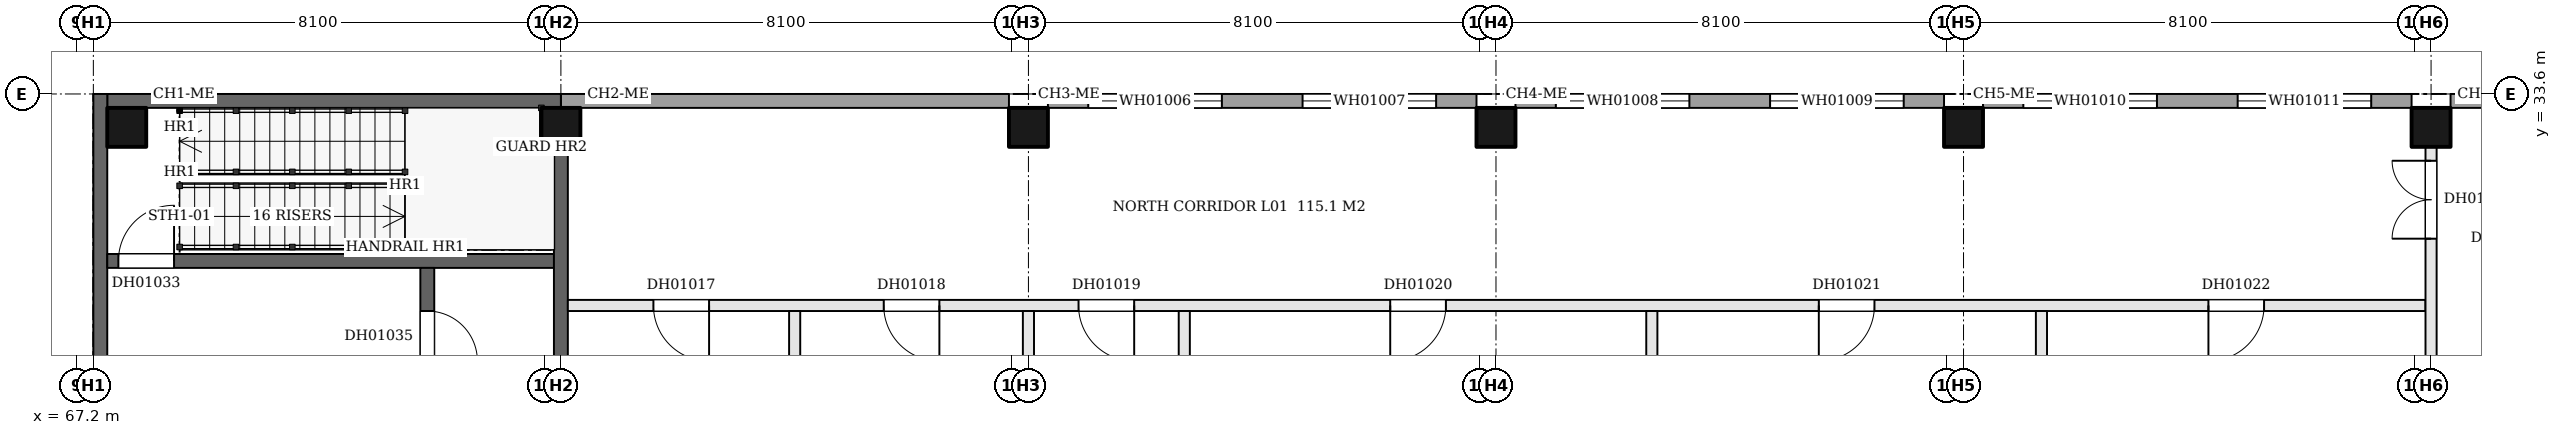
"""IFC4 building model, lengths in metres.
Left out: names, types, materials, properties, quantities, classifications, styles, units other than length and angle.
Written with IfcOpenShell. Run it as: python <this file> out.ifc"""

import sys

from ifc_helpers import new_model, si_unit, direction, frame, frame_2d, origin, origin_2d, place, context, subcontext, project, spatial, rectangle, extrude, element, fill, save


model = new_model("IFC4")
c1 = context("Model", 3, precision=1e-05, world=origin(), true_north=direction((0.0, 1.0)))
c2 = subcontext(c1, "Body", "Model", "MODEL_VIEW")
j1 = project(units=[si_unit("LENGTHUNIT", "METRE"), si_unit("PLANEANGLEUNIT", "RADIAN")], contexts=[c1])
p1 = place(None, origin())
s1 = spatial("IfcSite", under=j1, at=p1, CompositionType="ELEMENT")
p2 = place(p1, origin())
s2 = spatial("IfcBuilding", under=s1, at=p2, CompositionType="ELEMENT")
p3 = place(p2, frame((0.0, 0.0, 9.0)))
s3 = spatial("IfcBuildingStorey", under=s2, at=p3, CompositionType="ELEMENT", Elevation=9.0)
for number, where, z_axis, x_axis in (
    (1, (68.1, 33.0, 0.0), (0.0, 0.0, 1.0), (1.0, 0.0, 0.0)),
    (2, (75.9, 33.0, 0.0), (0.0, 0.0, 1.0), (1.0, 0.0, 0.0)),
    (3, (84.3, 33.0, 0.0), (0.0, 0.0, 1.0), (1.0, 0.0, 0.0)),
    (4, (92.7, 33.0, 0.0), (0.0, 0.0, 1.0), (1.0, 0.0, 0.0)),
    (5, (101.1, 33.0, 0.0), (0.0, 0.0, 1.0), (1.0, 0.0, 0.0)),
    (6, (109.5, 33.0, 0.0), (0.0, 0.0, 1.0), (1.0, 0.0, 0.0)),
):
    element("IfcColumn", number, at=place(p3, frame(where, z_axis=z_axis, x_axis=x_axis)), inside=s3, PredefinedType="COLUMN", context=c2, shape_type="SweptSolid", body=[
        extrude(rectangle(XDim=0.7, YDim=0.7, at=origin_2d()), origin(), (0.0, 0.0, 1.0), 5.1),
    ])
p4 = place(p3, frame((76.025, 29.8, 0.0), z_axis=(0.0, 0.0, 1.0), x_axis=(1.0, 0.0, 0.0)))
e7 = element("IfcWall", 7, at=p4, inside=s3, PredefinedType="PARTITIONING", context=c2, shape_type="SweptSolid", body=[
    extrude(rectangle(XDim=33.375, YDim=0.2, at=frame_2d((16.688, 0.0))), origin(), (0.0, 0.0, 1.0), 5.1),
])
p5 = place(p4, frame((1.538, 0.0, 0.0)))
e8 = element("IfcOpeningElement", 8, at=p5, cuts=e7, PredefinedType="OPENING", context=c2, shape_type="SweptSolid", body=[
    extrude(rectangle(XDim=1.0, YDim=2.1, at=frame_2d((0.5, 1.05))), frame((0.0, 0.11, 0.0), z_axis=(0.0, -1.0, 0.0), x_axis=(1.0, 0.0, 0.0)), (0.0, 0.0, 1.0), 0.22),
])
p6 = place(p4, frame((5.675, 0.0, 0.0)))
e9 = element("IfcOpeningElement", 9, at=p6, cuts=e7, PredefinedType="OPENING", context=c2, shape_type="SweptSolid", body=[
    extrude(rectangle(XDim=1.0, YDim=2.1, at=frame_2d((0.5, 1.05))), frame((0.0, 0.11, 0.0), z_axis=(0.0, -1.0, 0.0), x_axis=(1.0, 0.0, 0.0)), (0.0, 0.0, 1.0), 0.22),
])
p7 = place(p4, frame((9.175, 0.0, 0.0)))
e10 = element("IfcOpeningElement", 10, at=p7, cuts=e7, PredefinedType="OPENING", context=c2, shape_type="SweptSolid", body=[
    extrude(rectangle(XDim=1.0, YDim=2.1, at=frame_2d((0.5, 1.05))), frame((0.0, 0.11, 0.0), z_axis=(0.0, -1.0, 0.0), x_axis=(1.0, 0.0, 0.0)), (0.0, 0.0, 1.0), 0.22),
])
p8 = place(p4, frame((14.775, 0.0, 0.0)))
e11 = element("IfcOpeningElement", 11, at=p8, cuts=e7, PredefinedType="OPENING", context=c2, shape_type="SweptSolid", body=[
    extrude(rectangle(XDim=1.0, YDim=2.1, at=frame_2d((0.5, 1.05))), frame((0.0, 0.11, 0.0), z_axis=(0.0, -1.0, 0.0), x_axis=(1.0, 0.0, 0.0)), (0.0, 0.0, 1.0), 0.22),
])
p9 = place(p4, frame((22.475, 0.0, 0.0)))
e12 = element("IfcOpeningElement", 12, at=p9, cuts=e7, PredefinedType="OPENING", context=c2, shape_type="SweptSolid", body=[
    extrude(rectangle(XDim=1.0, YDim=2.1, at=frame_2d((0.5, 1.05))), frame((0.0, 0.11, 0.0), z_axis=(0.0, -1.0, 0.0), x_axis=(1.0, 0.0, 0.0)), (0.0, 0.0, 1.0), 0.22),
])
p10 = place(p4, frame((29.475, 0.0, 0.0)))
e13 = element("IfcOpeningElement", 13, at=p10, cuts=e7, PredefinedType="OPENING", context=c2, shape_type="SweptSolid", body=[
    extrude(rectangle(XDim=1.0, YDim=2.1, at=frame_2d((0.5, 1.05))), frame((0.0, 0.11, 0.0), z_axis=(0.0, -1.0, 0.0), x_axis=(1.0, 0.0, 0.0)), (0.0, 0.0, 1.0), 0.22),
])
p11 = place(p3, frame((67.75, 30.6, 0.0), z_axis=(0.0, 0.0, 1.0), x_axis=(1.0, 0.0, 0.0)))
e14 = element("IfcWall", 14, at=p11, inside=s3, PredefinedType="SHEAR", context=c2, shape_type="SweptSolid", body=[
    extrude(rectangle(XDim=8.025, YDim=0.25, at=frame_2d((4.012, 0.0))), origin(), (0.0, 0.0, 1.0), 5.1),
])
p12 = place(p11, frame((0.2, 0.0, 0.0)))
e15 = element("IfcOpeningElement", 15, at=p12, cuts=e14, PredefinedType="OPENING", context=c2, shape_type="SweptSolid", body=[
    extrude(rectangle(XDim=1.0, YDim=2.1, at=frame_2d((0.5, 1.05))), frame((0.0, 0.135, 0.0), z_axis=(0.0, -1.0, 0.0), x_axis=(1.0, 0.0, 0.0)), (0.0, 0.0, 1.0), 0.27),
])
p13 = place(p3, frame((67.75, 33.475, 0.0), z_axis=(0.0, 0.0, 1.0), x_axis=(1.0, 0.0, 0.0)))
e16 = element("IfcWall", 16, at=p13, inside=s3, PredefinedType="SHEAR", context=c2, shape_type="SweptSolid", body=[
    extrude(rectangle(XDim=8.15, YDim=0.25, at=frame_2d((4.075, 0.0))), origin(), (0.0, 0.0, 1.0), 5.1),
])
p14 = place(p3, frame((75.9, 33.475, 0.0), z_axis=(0.0, 0.0, 1.0), x_axis=(1.0, 0.0, 0.0)))
e17 = element("IfcWall", 17, at=p14, inside=s3, PredefinedType="SOLIDWALL", context=c2, shape_type="SweptSolid", body=[
    extrude(rectangle(XDim=8.05, YDim=0.25, at=frame_2d((4.025, 0.0))), origin(), (0.0, 0.0, 1.0), 5.1),
])
p15 = place(p3, frame((84.65, 33.475, 0.0), z_axis=(0.0, 0.0, 1.0), x_axis=(1.0, 0.0, 0.0)))
e18 = element("IfcWall", 18, at=p15, inside=s3, PredefinedType="SOLIDWALL", context=c2, shape_type="SweptSolid", body=[
    extrude(rectangle(XDim=7.7, YDim=0.25, at=frame_2d((3.85, 0.0))), origin(), (0.0, 0.0, 1.0), 5.1),
])
p16 = place(p15, frame((0.725, 0.0, 0.9)))
e19 = element("IfcOpeningElement", 19, at=p16, cuts=e18, PredefinedType="OPENING", context=c2, shape_type="SweptSolid", body=[
    extrude(rectangle(XDim=2.4, YDim=1.5, at=frame_2d((1.2, 0.75))), frame((0.0, 0.135, 0.0), z_axis=(0.0, -1.0, 0.0), x_axis=(1.0, 0.0, 0.0)), (0.0, 0.0, 1.0), 0.27),
])
p17 = place(p15, frame((4.575, 0.0, 0.9)))
e20 = element("IfcOpeningElement", 20, at=p17, cuts=e18, PredefinedType="OPENING", context=c2, shape_type="SweptSolid", body=[
    extrude(rectangle(XDim=2.4, YDim=1.5, at=frame_2d((1.2, 0.75))), frame((0.0, 0.135, 0.0), z_axis=(0.0, -1.0, 0.0), x_axis=(1.0, 0.0, 0.0)), (0.0, 0.0, 1.0), 0.27),
])
p18 = place(p3, frame((93.05, 33.475, 0.0), z_axis=(0.0, 0.0, 1.0), x_axis=(1.0, 0.0, 0.0)))
e21 = element("IfcWall", 21, at=p18, inside=s3, PredefinedType="SOLIDWALL", context=c2, shape_type="SweptSolid", body=[
    extrude(rectangle(XDim=7.7, YDim=0.25, at=frame_2d((3.85, 0.0))), origin(), (0.0, 0.0, 1.0), 5.1),
])
p19 = place(p18, frame((0.725, 0.0, 0.9)))
e22 = element("IfcOpeningElement", 22, at=p19, cuts=e21, PredefinedType="OPENING", context=c2, shape_type="SweptSolid", body=[
    extrude(rectangle(XDim=2.4, YDim=1.5, at=frame_2d((1.2, 0.75))), frame((0.0, 0.135, 0.0), z_axis=(0.0, -1.0, 0.0), x_axis=(1.0, 0.0, 0.0)), (0.0, 0.0, 1.0), 0.27),
])
p20 = place(p18, frame((4.575, 0.0, 0.9)))
e23 = element("IfcOpeningElement", 23, at=p20, cuts=e21, PredefinedType="OPENING", context=c2, shape_type="SweptSolid", body=[
    extrude(rectangle(XDim=2.4, YDim=1.5, at=frame_2d((1.2, 0.75))), frame((0.0, 0.135, 0.0), z_axis=(0.0, -1.0, 0.0), x_axis=(1.0, 0.0, 0.0)), (0.0, 0.0, 1.0), 0.27),
])
p21 = place(p3, frame((101.45, 33.475, 0.0), z_axis=(0.0, 0.0, 1.0), x_axis=(1.0, 0.0, 0.0)))
e24 = element("IfcWall", 24, at=p21, inside=s3, PredefinedType="SOLIDWALL", context=c2, shape_type="SweptSolid", body=[
    extrude(rectangle(XDim=7.7, YDim=0.25, at=frame_2d((3.85, 0.0))), origin(), (0.0, 0.0, 1.0), 5.1),
])
p22 = place(p21, frame((0.725, 0.0, 0.9)))
e25 = element("IfcOpeningElement", 25, at=p22, cuts=e24, PredefinedType="OPENING", context=c2, shape_type="SweptSolid", body=[
    extrude(rectangle(XDim=2.4, YDim=1.5, at=frame_2d((1.2, 0.75))), frame((0.0, 0.135, 0.0), z_axis=(0.0, -1.0, 0.0), x_axis=(1.0, 0.0, 0.0)), (0.0, 0.0, 1.0), 0.27),
])
p23 = place(p21, frame((4.575, 0.0, 0.9)))
e26 = element("IfcOpeningElement", 26, at=p23, cuts=e24, PredefinedType="OPENING", context=c2, shape_type="SweptSolid", body=[
    extrude(rectangle(XDim=2.4, YDim=1.5, at=frame_2d((1.2, 0.75))), frame((0.0, 0.135, 0.0), z_axis=(0.0, -1.0, 0.0), x_axis=(1.0, 0.0, 0.0)), (0.0, 0.0, 1.0), 0.27),
])
p24 = place(p3, frame((109.85, 33.475, 0.0), z_axis=(0.0, 0.0, 1.0), x_axis=(1.0, 0.0, 0.0)))
e27 = element("IfcWall", 27, at=p24, inside=s3, PredefinedType="SOLIDWALL", context=c2, shape_type="SweptSolid", body=[
    extrude(rectangle(XDim=1.725, YDim=0.25, at=frame_2d((0.862, 0.0))), origin(), (0.0, 0.0, 1.0), 5.1),
])
p25 = place(p3, frame((67.625, 25.325, 0.0), z_axis=(0.0, 0.0, 1.0), x_axis=(0.0, 1.0, 0.0)))
e28 = element("IfcWall", 28, at=p25, inside=s3, PredefinedType="SHEAR", context=c2, shape_type="SweptSolid", body=[
    extrude(rectangle(XDim=8.275, YDim=0.25, at=frame_2d((4.138, 0.0))), origin(), (0.0, 0.0, 1.0), 5.1),
])
p26 = place(p3, frame((73.5, 25.325, 0.0), z_axis=(0.0, 0.0, 1.0), x_axis=(0.0, 1.0, 0.0)))
e29 = element("IfcWall", 29, at=p26, inside=s3, PredefinedType="SHEAR", context=c2, shape_type="SweptSolid", body=[
    extrude(rectangle(XDim=5.15, YDim=0.25, at=frame_2d((2.575, 0.0))), origin(), (0.0, 0.0, 1.0), 5.1),
])
p27 = place(p26, frame((0.675, 0.0, 0.0)))
e30 = element("IfcOpeningElement", 30, at=p27, cuts=e29, PredefinedType="OPENING", context=c2, shape_type="SweptSolid", body=[
    extrude(rectangle(XDim=1.1, YDim=2.1, at=frame_2d((0.55, 1.05))), frame((0.0, 0.135, 0.0), z_axis=(0.0, -1.0, 0.0), x_axis=(1.0, 0.0, 0.0)), (0.0, 0.0, 1.0), 0.27),
])
p28 = place(p26, frame((3.475, 0.0, 0.0)))
e31 = element("IfcOpeningElement", 31, at=p28, cuts=e29, PredefinedType="OPENING", context=c2, shape_type="SweptSolid", body=[
    extrude(rectangle(XDim=0.9, YDim=2.1, at=frame_2d((0.45, 1.05))), frame((0.0, 0.135, 0.0), z_axis=(0.0, -1.0, 0.0), x_axis=(1.0, 0.0, 0.0)), (0.0, 0.0, 1.0), 0.27),
])
p29 = place(p3, frame((75.9, 25.55, 0.0), z_axis=(0.0, 0.0, 1.0), x_axis=(0.0, 1.0, 0.0)))
e32 = element("IfcWall", 32, at=p29, inside=s3, PredefinedType="SHEAR", context=c2, shape_type="SweptSolid", body=[
    extrude(rectangle(XDim=7.1, YDim=0.25, at=frame_2d((3.55, 0.0))), origin(), (0.0, 0.0, 1.0), 5.1),
])
p30 = place(p3, frame((80.1, 25.3, 0.0), z_axis=(0.0, 0.0, 1.0), x_axis=(0.0, 1.0, 0.0)))
e33 = element("IfcWall", 33, at=p30, inside=s3, PredefinedType="PARTITIONING", context=c2, shape_type="SweptSolid", body=[
    extrude(rectangle(XDim=4.4, YDim=0.2, at=frame_2d((2.2, 0.0))), origin(), (0.0, 0.0, 1.0), 5.1),
])
p31 = place(p3, frame((84.3, 25.55, 0.0), z_axis=(0.0, 0.0, 1.0), x_axis=(0.0, 1.0, 0.0)))
e34 = element("IfcWall", 34, at=p31, inside=s3, PredefinedType="PARTITIONING", context=c2, shape_type="SweptSolid", body=[
    extrude(rectangle(XDim=4.15, YDim=0.2, at=frame_2d((2.075, 0.0))), origin(), (0.0, 0.0, 1.0), 5.1),
])
for number, where, z_axis, x_axis in (
    (35, (87.1, 25.3, 0.0), (0.0, 0.0, 1.0), (0.0, 1.0, 0.0)),
    (36, (95.5, 25.3, 0.0), (0.0, 0.0, 1.0), (0.0, 1.0, 0.0)),
    (37, (102.5, 25.3, 0.0), (0.0, 0.0, 1.0), (0.0, 1.0, 0.0)),
):
    element("IfcWall", number, at=place(p3, frame(where, z_axis=z_axis, x_axis=x_axis)), inside=s3, PredefinedType="PARTITIONING", context=c2, shape_type="SweptSolid", body=[
        extrude(rectangle(XDim=4.4, YDim=0.2, at=frame_2d((2.2, 0.0))), origin(), (0.0, 0.0, 1.0), 5.1),
    ])
p32 = place(p3, frame((109.5, 25.55, 0.0), z_axis=(0.0, 0.0, 1.0), x_axis=(0.0, 1.0, 0.0)))
e38 = element("IfcWall", 38, at=p32, inside=s3, PredefinedType="PARTITIONING", context=c2, shape_type="SweptSolid", body=[
    extrude(rectangle(XDim=7.1, YDim=0.2, at=frame_2d((3.55, 0.0))), origin(), (0.0, 0.0, 1.0), 5.1),
])
p33 = place(p32, frame((5.45, 0.0, 0.0)))
e39 = element("IfcOpeningElement", 39, at=p33, cuts=e38, PredefinedType="OPENING", context=c2, shape_type="SweptSolid", body=[
    extrude(rectangle(XDim=1.4, YDim=2.1, at=frame_2d((0.7, 1.05))), frame((0.0, 0.11, 0.0), z_axis=(0.0, -1.0, 0.0), x_axis=(1.0, 0.0, 0.0)), (0.0, 0.0, 1.0), 0.22),
])
p34 = place(p5, frame((1.0, 0.0, 0.0), z_axis=(0.0, 0.0, 1.0), x_axis=(-1.0, 0.0, 0.0)))
e40 = element("IfcDoor", 40, at=p34, inside=s3, OperationType="SINGLE_SWING_LEFT", PredefinedType="DOOR", context=c2, shape_type="SweptSolid", body=[
    extrude(rectangle(XDim=1.0, YDim=2.1, at=frame_2d((0.5, 1.05))), frame((0.0, 0.025, 0.0), z_axis=(0.0, -1.0, 0.0), x_axis=(1.0, 0.0, 0.0)), (0.0, 0.0, 1.0), 0.05),
])
fill(e8, e40)
p35 = place(p6, frame((1.0, 0.0, 0.0), z_axis=(0.0, 0.0, 1.0), x_axis=(-1.0, 0.0, 0.0)))
e41 = element("IfcDoor", 41, at=p35, inside=s3, OperationType="SINGLE_SWING_LEFT", PredefinedType="DOOR", context=c2, shape_type="SweptSolid", body=[
    extrude(rectangle(XDim=1.0, YDim=2.1, at=frame_2d((0.5, 1.05))), frame((0.0, 0.025, 0.0), z_axis=(0.0, -1.0, 0.0), x_axis=(1.0, 0.0, 0.0)), (0.0, 0.0, 1.0), 0.05),
])
fill(e9, e41)
p36 = place(p7, frame((1.0, 0.0, 0.0), z_axis=(0.0, 0.0, 1.0), x_axis=(-1.0, 0.0, 0.0)))
e42 = element("IfcDoor", 42, at=p36, inside=s3, OperationType="SINGLE_SWING_LEFT", PredefinedType="DOOR", context=c2, shape_type="SweptSolid", body=[
    extrude(rectangle(XDim=1.0, YDim=2.1, at=frame_2d((0.5, 1.05))), frame((0.0, 0.025, 0.0), z_axis=(0.0, -1.0, 0.0), x_axis=(1.0, 0.0, 0.0)), (0.0, 0.0, 1.0), 0.05),
])
fill(e10, e42)
p37 = place(p8, frame((1.0, 0.0, 0.0), z_axis=(0.0, 0.0, 1.0), x_axis=(-1.0, 0.0, 0.0)))
e43 = element("IfcDoor", 43, at=p37, inside=s3, OperationType="SINGLE_SWING_RIGHT", PredefinedType="DOOR", context=c2, shape_type="SweptSolid", body=[
    extrude(rectangle(XDim=1.0, YDim=2.1, at=frame_2d((0.5, 1.05))), frame((0.0, 0.025, 0.0), z_axis=(0.0, -1.0, 0.0), x_axis=(1.0, 0.0, 0.0)), (0.0, 0.0, 1.0), 0.05),
])
fill(e11, e43)
p38 = place(p9, frame((1.0, 0.0, 0.0), z_axis=(0.0, 0.0, 1.0), x_axis=(-1.0, 0.0, 0.0)))
e44 = element("IfcDoor", 44, at=p38, inside=s3, OperationType="SINGLE_SWING_RIGHT", PredefinedType="DOOR", context=c2, shape_type="SweptSolid", body=[
    extrude(rectangle(XDim=1.0, YDim=2.1, at=frame_2d((0.5, 1.05))), frame((0.0, 0.025, 0.0), z_axis=(0.0, -1.0, 0.0), x_axis=(1.0, 0.0, 0.0)), (0.0, 0.0, 1.0), 0.05),
])
fill(e12, e44)
p39 = place(p10, frame((1.0, 0.0, 0.0), z_axis=(0.0, 0.0, 1.0), x_axis=(-1.0, 0.0, 0.0)))
e45 = element("IfcDoor", 45, at=p39, inside=s3, OperationType="SINGLE_SWING_RIGHT", PredefinedType="DOOR", context=c2, shape_type="SweptSolid", body=[
    extrude(rectangle(XDim=1.0, YDim=2.1, at=frame_2d((0.5, 1.05))), frame((0.0, 0.025, 0.0), z_axis=(0.0, -1.0, 0.0), x_axis=(1.0, 0.0, 0.0)), (0.0, 0.0, 1.0), 0.05),
])
fill(e13, e45)
p40 = place(p33, origin())
e46 = element("IfcDoor", 46, at=p40, inside=s3, OperationType="DOUBLE_DOOR_SINGLE_SWING", PredefinedType="DOOR", context=c2, shape_type="SweptSolid", body=[
    extrude(rectangle(XDim=1.4, YDim=2.1, at=frame_2d((0.7, 1.05))), frame((0.0, 0.025, 0.0), z_axis=(0.0, -1.0, 0.0), x_axis=(1.0, 0.0, 0.0)), (0.0, 0.0, 1.0), 0.05),
])
fill(e39, e46)
p41 = place(p12, origin())
e47 = element("IfcDoor", 47, at=p41, inside=s3, OperationType="SINGLE_SWING_RIGHT", PredefinedType="DOOR", context=c2, shape_type="SweptSolid", body=[
    extrude(rectangle(XDim=1.0, YDim=2.1, at=frame_2d((0.5, 1.05))), frame((0.0, 0.025, 0.0), z_axis=(0.0, -1.0, 0.0), x_axis=(1.0, 0.0, 0.0)), (0.0, 0.0, 1.0), 0.05),
])
fill(e15, e47)
p42 = place(p28, frame((0.9, 0.0, 0.0), z_axis=(0.0, 0.0, 1.0), x_axis=(-1.0, 0.0, 0.0)))
e48 = element("IfcDoor", 48, at=p42, inside=s3, OperationType="SINGLE_SWING_RIGHT", PredefinedType="DOOR", context=c2, shape_type="SweptSolid", body=[
    extrude(rectangle(XDim=0.9, YDim=2.1, at=frame_2d((0.45, 1.05))), frame((0.0, 0.025, 0.0), z_axis=(0.0, -1.0, 0.0), x_axis=(1.0, 0.0, 0.0)), (0.0, 0.0, 1.0), 0.05),
])
fill(e31, e48)
p43 = place(p16, origin())
e49 = element("IfcWindow", 49, at=p43, inside=s3, PartitioningType="DOUBLE_PANEL_VERTICAL", PredefinedType="WINDOW", context=c2, shape_type="SweptSolid", body=[
    extrude(rectangle(XDim=2.4, YDim=1.5, at=frame_2d((1.2, 0.75))), frame((0.0, 0.03, 0.0), z_axis=(0.0, -1.0, 0.0), x_axis=(1.0, 0.0, 0.0)), (0.0, 0.0, 1.0), 0.06),
])
fill(e19, e49)
p44 = place(p17, origin())
e50 = element("IfcWindow", 50, at=p44, inside=s3, PartitioningType="DOUBLE_PANEL_VERTICAL", PredefinedType="WINDOW", context=c2, shape_type="SweptSolid", body=[
    extrude(rectangle(XDim=2.4, YDim=1.5, at=frame_2d((1.2, 0.75))), frame((0.0, 0.03, 0.0), z_axis=(0.0, -1.0, 0.0), x_axis=(1.0, 0.0, 0.0)), (0.0, 0.0, 1.0), 0.06),
])
fill(e20, e50)
p45 = place(p19, origin())
e51 = element("IfcWindow", 51, at=p45, inside=s3, PartitioningType="DOUBLE_PANEL_VERTICAL", PredefinedType="WINDOW", context=c2, shape_type="SweptSolid", body=[
    extrude(rectangle(XDim=2.4, YDim=1.5, at=frame_2d((1.2, 0.75))), frame((0.0, 0.03, 0.0), z_axis=(0.0, -1.0, 0.0), x_axis=(1.0, 0.0, 0.0)), (0.0, 0.0, 1.0), 0.06),
])
fill(e22, e51)
p46 = place(p20, origin())
e52 = element("IfcWindow", 52, at=p46, inside=s3, PartitioningType="DOUBLE_PANEL_VERTICAL", PredefinedType="WINDOW", context=c2, shape_type="SweptSolid", body=[
    extrude(rectangle(XDim=2.4, YDim=1.5, at=frame_2d((1.2, 0.75))), frame((0.0, 0.03, 0.0), z_axis=(0.0, -1.0, 0.0), x_axis=(1.0, 0.0, 0.0)), (0.0, 0.0, 1.0), 0.06),
])
fill(e23, e52)
p47 = place(p22, origin())
e53 = element("IfcWindow", 53, at=p47, inside=s3, PartitioningType="DOUBLE_PANEL_VERTICAL", PredefinedType="WINDOW", context=c2, shape_type="SweptSolid", body=[
    extrude(rectangle(XDim=2.4, YDim=1.5, at=frame_2d((1.2, 0.75))), frame((0.0, 0.03, 0.0), z_axis=(0.0, -1.0, 0.0), x_axis=(1.0, 0.0, 0.0)), (0.0, 0.0, 1.0), 0.06),
])
fill(e25, e53)
p48 = place(p23, origin())
e54 = element("IfcWindow", 54, at=p48, inside=s3, PartitioningType="DOUBLE_PANEL_VERTICAL", PredefinedType="WINDOW", context=c2, shape_type="SweptSolid", body=[
    extrude(rectangle(XDim=2.4, YDim=1.5, at=frame_2d((1.2, 0.75))), frame((0.0, 0.03, 0.0), z_axis=(0.0, -1.0, 0.0), x_axis=(1.0, 0.0, 0.0)), (0.0, 0.0, 1.0), 0.06),
])
fill(e26, e54)
save(model, sys.argv[1])
